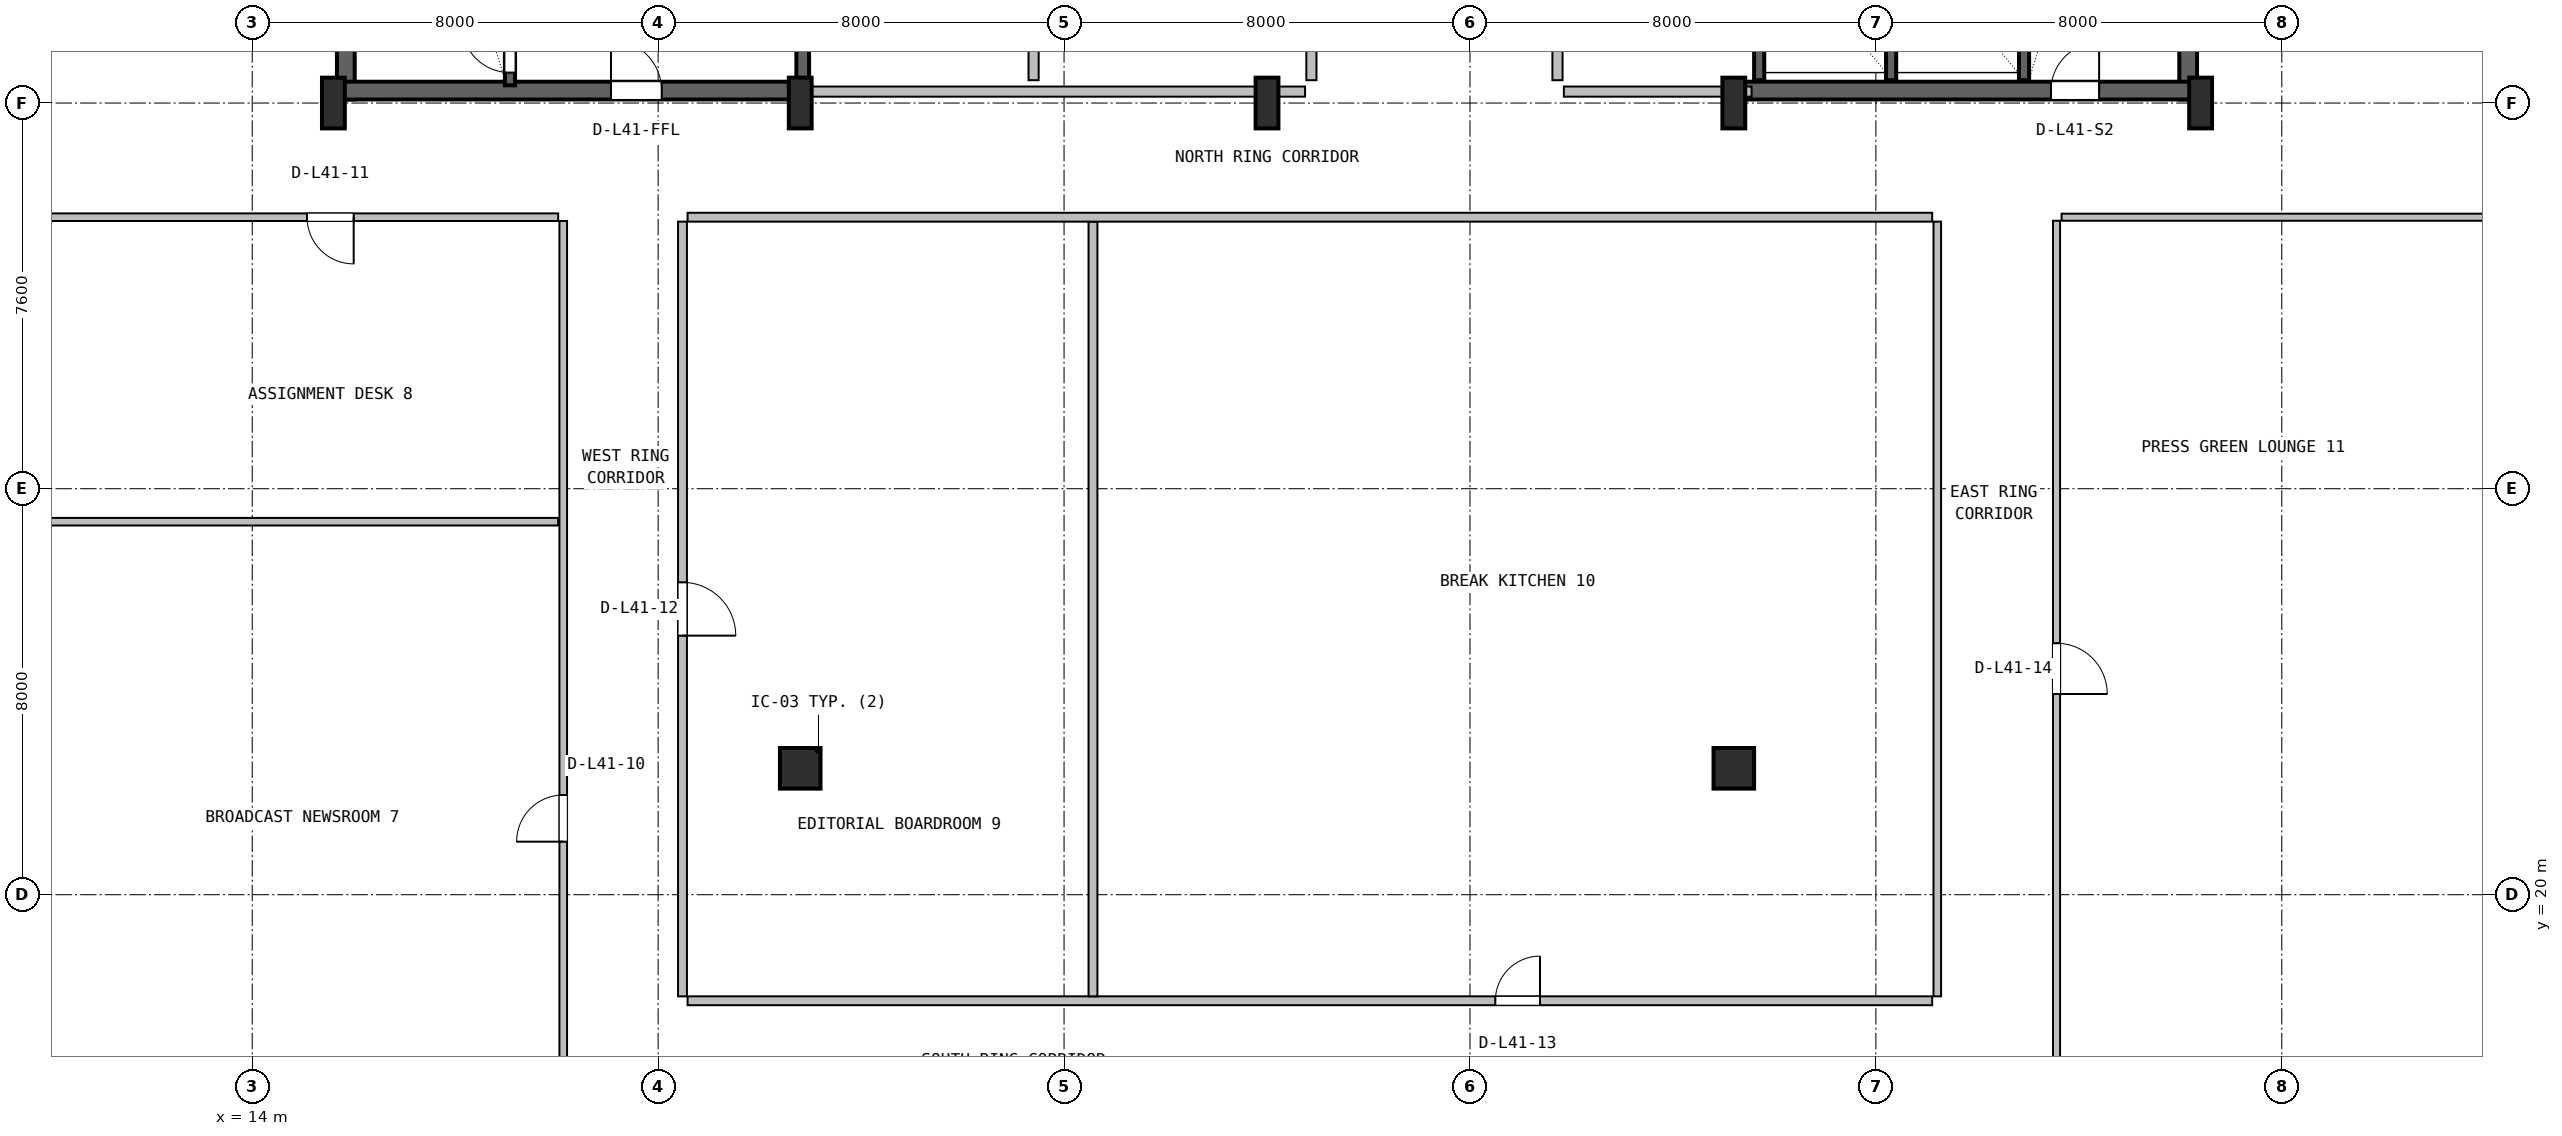
"""IFC4 building model, lengths in metres.
Left out: names, types, materials, properties, quantities, classifications, styles, units other than length and angle.
Written with IfcOpenShell. Run it as: python <this file> out.ifc"""

import sys

from ifc_helpers import new_model, si_unit, direction, frame, frame_2d, origin, origin_2d, place, context, subcontext, project, spatial, rectangle, i_section, extrude, source, transform, mapped, element, fill, save


model = new_model("IFC4")
c1 = context("Model", 3, precision=1e-05, world=origin(), true_north=direction((0.0, 1.0)))
c2 = subcontext(c1, "Body", "Model", "MODEL_VIEW")
j1 = project(units=[si_unit("LENGTHUNIT", "METRE"), si_unit("PLANEANGLEUNIT", "RADIAN")], contexts=[c1])
p1 = place(None, origin())
s1 = spatial("IfcSite", under=j1, at=p1, CompositionType="ELEMENT")
p2 = place(p1, origin())
s2 = spatial("IfcBuilding", under=s1, at=p2, CompositionType="ELEMENT")
p3 = place(p2, frame((0.0, 0.0, 168.6)))
s3 = spatial("IfcBuildingStorey", under=s2, at=p3, CompositionType="ELEMENT", Elevation=168.6)
for number, where, z_axis, x_axis in (
    (1, (15.845, 35.67, 0.0), (0.0, 0.0, 1.0), (0.0, 1.0, 0.0)),
    (2, (52.155, 35.67, 0.0), (0.0, 0.0, 1.0), (0.0, 1.0, 0.0)),
):
    element("IfcWall", number, at=place(p3, frame(where, z_axis=z_axis, x_axis=x_axis)), inside=s3, PredefinedType="SHEAR", context=c2, shape_type="SweptSolid", body=[
        extrude(rectangle(XDim=11.13, YDim=0.35, at=frame_2d((5.565, 0.0))), origin(), (0.0, 0.0, 1.0), 3.55),
    ])
p4 = place(p3, frame((15.67, 35.845, 0.0), z_axis=(0.0, 0.0, 1.0), x_axis=(1.0, 0.0, 0.0)))
e3 = element("IfcWall", 3, at=p4, inside=s3, PredefinedType="SHEAR", context=c2, shape_type="SweptSolid", body=[
    extrude(rectangle(XDim=9.13, YDim=0.35, at=frame_2d((4.565, 0.0))), origin(), (0.0, 0.0, 1.0), 3.55),
])
p5 = place(p4, frame((5.4, 0.0, 0.0)))
e4 = element("IfcOpeningElement", 4, at=p5, cuts=e3, PredefinedType="OPENING", context=c2, shape_type="SweptSolid", body=[
    extrude(rectangle(XDim=1.0, YDim=2.1, at=frame_2d((0.5, 1.05))), frame((0.0, 0.185, 0.0), z_axis=(0.0, -1.0, 0.0), x_axis=(1.0, 0.0, 0.0)), (0.0, 0.0, 1.0), 0.37),
])
p6 = place(p3, frame((43.2, 35.845, 0.0), z_axis=(0.0, 0.0, 1.0), x_axis=(1.0, 0.0, 0.0)))
e5 = element("IfcWall", 5, at=p6, inside=s3, PredefinedType="SHEAR", context=c2, shape_type="SweptSolid", body=[
    extrude(rectangle(XDim=9.13, YDim=0.35, at=frame_2d((4.565, 0.0))), origin(), (0.0, 0.0, 1.0), 3.55),
])
p7 = place(p6, frame((6.25, 0.0, 0.0)))
e6 = element("IfcOpeningElement", 6, at=p7, cuts=e5, PredefinedType="OPENING", context=c2, shape_type="SweptSolid", body=[
    extrude(rectangle(XDim=0.95, YDim=2.1, at=frame_2d((0.475, 1.05))), frame((0.0, 0.185, 0.0), z_axis=(0.0, -1.0, 0.0), x_axis=(1.0, 0.0, 0.0)), (0.0, 0.0, 1.0), 0.37),
])
m1 = source(origin(), c2, "Body", "SweptSolid", [
    extrude(i_section(OverallWidth=0.45, OverallDepth=1.0, WebThickness=0.016, FlangeThickness=0.03, FilletRadius=0.016, at=origin_2d()), origin(), (0.0, 0.0, 1.0), 3.8),
])
for number, where, z_axis, x_axis in (
    (7, (15.6, 35.6, 0.0), (0.0, 0.0, 1.0), (1.0, 0.0, 0.0)),
    (8, (24.8, 35.6, 0.0), (0.0, 0.0, 1.0), (1.0, 0.0, 0.0)),
    (9, (34.0, 35.6, 0.0), (0.0, 0.0, 1.0), (1.0, 0.0, 0.0)),
    (10, (43.2, 35.6, 0.0), (0.0, 0.0, 1.0), (1.0, 0.0, 0.0)),
    (11, (52.4, 35.6, 0.0), (0.0, 0.0, 1.0), (1.0, 0.0, 0.0)),
):
    element("IfcColumn", number, at=place(p3, frame(where, z_axis=z_axis, x_axis=x_axis)), inside=s3, PredefinedType="COLUMN", context=c2, shape_type="MappedRepresentation", body=[
        mapped(m1, transform((0.0, 0.0, 0.0), x_axis=(1.0, 0.0, 0.0), y_axis=(0.0, 1.0, 0.0), z_axis=(0.0, 0.0, 1.0), scale=1.0)),
    ])
m2 = source(origin(), c2, "Body", "SweptSolid", [
    extrude(rectangle(XDim=0.8, YDim=0.8, at=origin_2d()), origin(), (0.0, 0.0, 1.0), 3.8),
])
for number, where, z_axis, x_axis in (
    (12, (24.8, 22.49, 0.0), (0.0, 0.0, 1.0), (1.0, 0.0, 0.0)),
    (13, (43.2, 22.49, 0.0), (0.0, 0.0, 1.0), (1.0, 0.0, 0.0)),
):
    element("IfcColumn", number, at=place(p3, frame(where, z_axis=z_axis, x_axis=x_axis)), inside=s3, PredefinedType="COLUMN", context=c2, shape_type="MappedRepresentation", body=[
        mapped(m2, transform((0.0, 0.0, 0.0), x_axis=(1.0, 0.0, 0.0), y_axis=(0.0, 1.0, 0.0), z_axis=(0.0, 0.0, 1.0), scale=1.0)),
    ])
p8 = place(p3, frame((19.08, 35.95, 0.0), z_axis=(0.0, 0.0, 1.0), x_axis=(0.0, 1.0, 0.0)))
e14 = element("IfcWall", 14, at=p8, inside=s3, PredefinedType="SHEAR", context=c2, shape_type="SweptSolid", body=[
    extrude(rectangle(XDim=9.65, YDim=0.2, at=frame_2d((4.825, 0.0))), origin(), (0.0, 0.0, 1.0), 3.55),
])
p9 = place(p8, frame((0.25, 0.0, 0.0)))
e15 = element("IfcOpeningElement", 15, at=p9, cuts=e14, PredefinedType="OPENING", context=c2, shape_type="SweptSolid", body=[
    extrude(rectangle(XDim=0.95, YDim=2.1, at=frame_2d((0.475, 1.05))), frame((0.0, 0.11, 0.0), z_axis=(0.0, -1.0, 0.0), x_axis=(1.0, 0.0, 0.0)), (0.0, 0.0, 1.0), 0.22),
])
p10 = place(p3, frame((24.85, 36.05, 0.0), z_axis=(0.0, 0.0, 1.0), x_axis=(0.0, 1.0, 0.0)))
e16 = element("IfcWall", 16, at=p10, inside=s3, PredefinedType="SHEAR", context=c2, shape_type="SweptSolid", body=[
    extrude(rectangle(XDim=10.45, YDim=0.25, at=frame_2d((5.225, 0.0))), origin(), (0.0, 0.0, 1.0), 3.55),
])
p11 = place(p3, frame((48.92, 36.05, 0.0), z_axis=(0.0, 0.0, 1.0), x_axis=(0.0, 1.0, 0.0)))
e17 = element("IfcWall", 17, at=p11, inside=s3, PredefinedType="SHEAR", context=c2, shape_type="SweptSolid", body=[
    extrude(rectangle(XDim=10.5, YDim=0.2, at=frame_2d((5.25, 0.0))), origin(), (0.0, 0.0, 1.0), 3.55),
])
for number, where, z_axis, x_axis in (
    (18, (43.7, 36.05, 0.0), (0.0, 0.0, 1.0), (0.0, 1.0, 0.0)),
    (19, (46.3, 36.05, 0.0), (0.0, 0.0, 1.0), (0.0, 1.0, 0.0)),
):
    element("IfcWall", number, at=place(p3, frame(where, z_axis=z_axis, x_axis=x_axis)), inside=s3, PredefinedType="SHEAR", context=c2, shape_type="SweptSolid", body=[
        extrude(rectangle(XDim=3.05, YDim=0.2, at=frame_2d((1.525, 0.0))), origin(), (0.0, 0.0, 1.0), 3.55),
    ])
p12 = place(p3, frame((25.0, 35.825, 0.0), z_axis=(0.0, 0.0, 1.0), x_axis=(1.0, 0.0, 0.0)))
e20 = element("IfcWall", 20, at=p12, inside=s3, PredefinedType="PLUMBINGWALL", context=c2, shape_type="SweptSolid", body=[
    extrude(rectangle(XDim=9.75, YDim=0.2, at=frame_2d((4.875, 0.0))), origin(), (0.0, 0.0, 1.0), 2.575),
])
for number, where, z_axis, x_axis in (
    (21, (29.4, 36.05, 0.0), (0.0, 0.0, 1.0), (0.0, 1.0, 0.0)),
    (22, (34.875, 36.05, 0.0), (0.0, 0.0, 1.0), (0.0, 1.0, 0.0)),
):
    element("IfcWall", number, at=place(p3, frame(where, z_axis=z_axis, x_axis=x_axis)), inside=s3, PredefinedType="PLUMBINGWALL", context=c2, shape_type="SweptSolid", body=[
        extrude(rectangle(XDim=3.1, YDim=0.2, at=frame_2d((1.55, 0.0))), origin(), (0.0, 0.0, 1.0), 3.53),
    ])
p13 = place(p3, frame((39.85, 35.825, 0.0), z_axis=(0.0, 0.0, 1.0), x_axis=(1.0, 0.0, 0.0)))
e23 = element("IfcWall", 23, at=p13, inside=s3, PredefinedType="SOLIDWALL", context=c2, shape_type="SweptSolid", body=[
    extrude(rectangle(XDim=3.7, YDim=0.2, at=frame_2d((1.85, 0.0))), origin(), (0.0, 0.0, 1.0), 2.575),
])
p14 = place(p3, frame((39.725, 36.05, 0.0), z_axis=(0.0, 0.0, 1.0), x_axis=(0.0, 1.0, 0.0)))
e24 = element("IfcWall", 24, at=p14, inside=s3, PredefinedType="SOLIDWALL", context=c2, shape_type="SweptSolid", body=[
    extrude(rectangle(XDim=3.1, YDim=0.2, at=frame_2d((1.55, 0.0))), origin(), (0.0, 0.0, 1.0), 3.53),
])
p15 = place(p3, frame((20.13, 15.635, 0.0), z_axis=(0.0, 0.0, 1.0), x_axis=(0.0, 1.0, 0.0)))
e25 = element("IfcWall", 25, at=p15, inside=s3, PredefinedType="PARTITIONING", context=c2, shape_type="SweptSolid", body=[
    extrude(rectangle(XDim=17.64, YDim=0.15, at=frame_2d((8.82, 0.0))), origin(), (0.0, 0.0, 1.0), 3.222),
])
p16 = place(p15, frame((5.41, 0.0, 0.0)))
e26 = element("IfcOpeningElement", 26, at=p16, cuts=e25, PredefinedType="OPENING", context=c2, shape_type="SweptSolid", body=[
    extrude(rectangle(XDim=0.92, YDim=2.08, at=frame_2d((0.46, 1.04))), frame((0.0, 0.085, 0.0), z_axis=(0.0, -1.0, 0.0), x_axis=(1.0, 0.0, 0.0)), (0.0, 0.0, 1.0), 0.17),
])
p17 = place(p3, frame((7.18, 27.35, 0.0), z_axis=(0.0, 0.0, 1.0), x_axis=(1.0, 0.0, 0.0)))
e27 = element("IfcWall", 27, at=p17, inside=s3, PredefinedType="PARTITIONING", context=c2, shape_type="SweptSolid", body=[
    extrude(rectangle(XDim=12.85, YDim=0.15, at=frame_2d((6.425, 0.0))), origin(), (0.0, 0.0, 1.0), 3.108),
])
p18 = place(p3, frame((7.18, 33.35, 0.0), z_axis=(0.0, 0.0, 1.0), x_axis=(1.0, 0.0, 0.0)))
e28 = element("IfcWall", 28, at=p18, inside=s3, PredefinedType="PARTITIONING", context=c2, shape_type="SweptSolid", body=[
    extrude(rectangle(XDim=12.85, YDim=0.15, at=frame_2d((6.425, 0.0))), origin(), (0.0, 0.0, 1.0), 3.108),
])
p19 = place(p18, frame((7.9, 0.0, 0.0)))
e29 = element("IfcOpeningElement", 29, at=p19, cuts=e28, PredefinedType="OPENING", context=c2, shape_type="SweptSolid", body=[
    extrude(rectangle(XDim=0.92, YDim=2.08, at=frame_2d((0.46, 1.04))), frame((0.0, 0.085, 0.0), z_axis=(0.0, -1.0, 0.0), x_axis=(1.0, 0.0, 0.0)), (0.0, 0.0, 1.0), 0.17),
])
p20 = place(p3, frame((22.58, 17.91, 0.0), z_axis=(0.0, 0.0, 1.0), x_axis=(1.0, 0.0, 0.0)))
e30 = element("IfcWall", 30, at=p20, inside=s3, PredefinedType="PARTITIONING", context=c2, shape_type="SweptSolid", body=[
    extrude(rectangle(XDim=24.53, YDim=0.175, at=frame_2d((12.265, 0.0))), origin(), (0.0, 0.0, 1.0), 2.909),
])
p21 = place(p20, frame((15.92, 0.0, 0.0)))
e31 = element("IfcOpeningElement", 31, at=p21, cuts=e30, PredefinedType="OPENING", context=c2, shape_type="SweptSolid", body=[
    extrude(rectangle(XDim=0.88, YDim=2.06, at=frame_2d((0.44, 1.03))), frame((0.0, 0.098, 0.0), z_axis=(0.0, -1.0, 0.0), x_axis=(1.0, 0.0, 0.0)), (0.0, 0.0, 1.0), 0.195),
])
p22 = place(p3, frame((30.57, 17.997, 0.0), z_axis=(0.0, 0.0, 1.0), x_axis=(0.0, 1.0, 0.0)))
e32 = element("IfcWall", 32, at=p22, inside=s3, PredefinedType="PARTITIONING", context=c2, shape_type="SweptSolid", body=[
    extrude(rectangle(XDim=15.266, YDim=0.175, at=frame_2d((7.633, 0.0))), origin(), (0.0, 0.0, 1.0), 2.909),
])
p23 = place(p3, frame((22.58, 33.35, 0.0), z_axis=(0.0, 0.0, 1.0), x_axis=(1.0, 0.0, 0.0)))
e33 = element("IfcWall", 33, at=p23, inside=s3, PredefinedType="PARTITIONING", context=c2, shape_type="SweptSolid", body=[
    extrude(rectangle(XDim=24.53, YDim=0.175, at=frame_2d((12.265, 0.0))), origin(), (0.0, 0.0, 1.0), 2.909),
])
p24 = place(p3, frame((22.48, 17.997, 0.0), z_axis=(0.0, 0.0, 1.0), x_axis=(0.0, 1.0, 0.0)))
e34 = element("IfcWall", 34, at=p24, inside=s3, PredefinedType="PARTITIONING", context=c2, shape_type="SweptSolid", body=[
    extrude(rectangle(XDim=15.266, YDim=0.175, at=frame_2d((7.633, 0.0))), origin(), (0.0, 0.0, 1.0), 3.222),
])
p25 = place(p24, frame((7.108, 0.0, 0.0)))
e35 = element("IfcOpeningElement", 35, at=p25, cuts=e34, PredefinedType="OPENING", context=c2, shape_type="SweptSolid", body=[
    extrude(rectangle(XDim=1.05, YDim=2.1, at=frame_2d((0.525, 1.05))), frame((0.0, 0.098, 0.0), z_axis=(0.0, -1.0, 0.0), x_axis=(1.0, 0.0, 0.0)), (0.0, 0.0, 1.0), 0.195),
])
p26 = place(p3, frame((47.21, 17.997, 0.0), z_axis=(0.0, 0.0, 1.0), x_axis=(0.0, 1.0, 0.0)))
e36 = element("IfcWall", 36, at=p26, inside=s3, PredefinedType="PARTITIONING", context=c2, shape_type="SweptSolid", body=[
    extrude(rectangle(XDim=15.266, YDim=0.15, at=frame_2d((7.633, 0.0))), origin(), (0.0, 0.0, 1.0), 3.222),
])
p27 = place(p3, frame((49.66, 33.35, 0.0), z_axis=(0.0, 0.0, 1.0), x_axis=(1.0, 0.0, 0.0)))
e37 = element("IfcWall", 37, at=p27, inside=s3, PredefinedType="PARTITIONING", context=c2, shape_type="SweptSolid", body=[
    extrude(rectangle(XDim=11.16, YDim=0.14, at=frame_2d((5.58, 0.0))), origin(), (0.0, 0.0, 1.0), 3.108),
])
p28 = place(p3, frame((49.56, 15.635, 0.0), z_axis=(0.0, 0.0, 1.0), x_axis=(0.0, 1.0, 0.0)))
e38 = element("IfcWall", 38, at=p28, inside=s3, PredefinedType="PARTITIONING", context=c2, shape_type="SweptSolid", body=[
    extrude(rectangle(XDim=17.645, YDim=0.14, at=frame_2d((8.823, 0.0))), origin(), (0.0, 0.0, 1.0), 3.222),
])
p29 = place(p28, frame((8.32, 0.0, 0.0)))
e39 = element("IfcOpeningElement", 39, at=p29, cuts=e38, PredefinedType="OPENING", context=c2, shape_type="SweptSolid", body=[
    extrude(rectangle(XDim=1.0, YDim=2.1, at=frame_2d((0.5, 1.05))), frame((0.0, 0.08, 0.0), z_axis=(0.0, -1.0, 0.0), x_axis=(1.0, 0.0, 0.0)), (0.0, 0.0, 1.0), 0.16),
])
m3 = source(origin(), c2, "Body", "SweptSolid", [
    extrude(rectangle(XDim=0.95, YDim=2.1, at=frame_2d((0.475, 1.05))), frame((0.0, 0.025, 0.0), z_axis=(0.0, -1.0, 0.0), x_axis=(1.0, 0.0, 0.0)), (0.0, 0.0, 1.0), 0.05),
])
p30 = place(p9, origin())
e40 = element("IfcDoor", 40, at=p30, inside=s3, OperationType="SINGLE_SWING_RIGHT", PredefinedType="DOOR", context=c2, shape_type="MappedRepresentation", body=[
    mapped(m3, transform((0.0, 0.0, 0.0), x_axis=(1.0, 0.0, 0.0), y_axis=(0.0, 1.0, 0.0), z_axis=(0.0, 0.0, 1.0), scale=1.0)),
])
fill(e15, e40)
m4 = source(origin(), c2, "Body", "SweptSolid", [
    extrude(rectangle(XDim=1.0, YDim=2.1, at=frame_2d((0.5, 1.05))), frame((0.0, 0.025, 0.0), z_axis=(0.0, -1.0, 0.0), x_axis=(1.0, 0.0, 0.0)), (0.0, 0.0, 1.0), 0.05),
])
p31 = place(p5, origin())
e41 = element("IfcDoor", 41, at=p31, inside=s3, OperationType="SINGLE_SWING_LEFT", PredefinedType="DOOR", context=c2, shape_type="MappedRepresentation", body=[
    mapped(m4, transform((0.0, 0.0, 0.0), x_axis=(1.0, 0.0, 0.0), y_axis=(0.0, 1.0, 0.0), z_axis=(0.0, 0.0, 1.0), scale=1.0)),
])
fill(e4, e41)
p32 = place(p7, origin())
e42 = element("IfcDoor", 42, at=p32, inside=s3, OperationType="SINGLE_SWING_RIGHT", PredefinedType="DOOR", context=c2, shape_type="MappedRepresentation", body=[
    mapped(m3, transform((0.0, 0.0, 0.0), x_axis=(1.0, 0.0, 0.0), y_axis=(0.0, 1.0, 0.0), z_axis=(0.0, 0.0, 1.0), scale=1.0)),
])
fill(e6, e42)
m5 = source(origin(), c2, "Body", "SweptSolid", [
    extrude(rectangle(XDim=0.92, YDim=2.08, at=frame_2d((0.46, 1.04))), frame((0.0, 0.025, 0.0), z_axis=(0.0, -1.0, 0.0), x_axis=(1.0, 0.0, 0.0)), (0.0, 0.0, 1.0), 0.05),
])
p33 = place(p16, origin())
e43 = element("IfcDoor", 43, at=p33, inside=s3, OperationType="SINGLE_SWING_LEFT", PredefinedType="DOOR", context=c2, shape_type="MappedRepresentation", body=[
    mapped(m5, transform((0.0, 0.0, 0.0), x_axis=(1.0, 0.0, 0.0), y_axis=(0.0, 1.0, 0.0), z_axis=(0.0, 0.0, 1.0), scale=1.0)),
])
fill(e26, e43)
p34 = place(p19, frame((0.92, 0.0, 0.0), z_axis=(0.0, 0.0, 1.0), x_axis=(-1.0, 0.0, 0.0)))
e44 = element("IfcDoor", 44, at=p34, inside=s3, OperationType="SINGLE_SWING_RIGHT", PredefinedType="DOOR", context=c2, shape_type="MappedRepresentation", body=[
    mapped(m5, transform((0.0, 0.0, 0.0), x_axis=(1.0, 0.0, 0.0), y_axis=(0.0, 1.0, 0.0), z_axis=(0.0, 0.0, 1.0), scale=1.0)),
])
fill(e29, e44)
m6 = source(origin(), c2, "Body", "SweptSolid", [
    extrude(rectangle(XDim=1.05, YDim=2.1, at=frame_2d((0.525, 1.05))), frame((0.0, 0.025, 0.0), z_axis=(0.0, -1.0, 0.0), x_axis=(1.0, 0.0, 0.0)), (0.0, 0.0, 1.0), 0.05),
])
p35 = place(p25, frame((1.05, 0.0, 0.0), z_axis=(0.0, 0.0, 1.0), x_axis=(-1.0, 0.0, 0.0)))
e45 = element("IfcDoor", 45, at=p35, inside=s3, OperationType="SINGLE_SWING_LEFT", PredefinedType="DOOR", context=c2, shape_type="MappedRepresentation", body=[
    mapped(m6, transform((0.0, 0.0, 0.0), x_axis=(1.0, 0.0, 0.0), y_axis=(0.0, 1.0, 0.0), z_axis=(0.0, 0.0, 1.0), scale=1.0)),
])
fill(e35, e45)
m7 = source(origin(), c2, "Body", "SweptSolid", [
    extrude(rectangle(XDim=0.88, YDim=2.06, at=frame_2d((0.44, 1.03))), frame((0.0, 0.025, 0.0), z_axis=(0.0, -1.0, 0.0), x_axis=(1.0, 0.0, 0.0)), (0.0, 0.0, 1.0), 0.05),
])
p36 = place(p21, origin())
e46 = element("IfcDoor", 46, at=p36, inside=s3, OperationType="SINGLE_SWING_RIGHT", PredefinedType="DOOR", context=c2, shape_type="MappedRepresentation", body=[
    mapped(m7, transform((0.0, 0.0, 0.0), x_axis=(1.0, 0.0, 0.0), y_axis=(0.0, 1.0, 0.0), z_axis=(0.0, 0.0, 1.0), scale=1.0)),
])
fill(e31, e46)
m8 = source(origin(), c2, "Body", "SweptSolid", [
    extrude(rectangle(XDim=1.0, YDim=2.1, at=frame_2d((0.5, 1.05))), frame((0.0, 0.025, 0.0), z_axis=(0.0, -1.0, 0.0), x_axis=(1.0, 0.0, 0.0)), (0.0, 0.0, 1.0), 0.05),
])
p37 = place(p29, frame((1.0, 0.0, 0.0), z_axis=(0.0, 0.0, 1.0), x_axis=(-1.0, 0.0, 0.0)))
e47 = element("IfcDoor", 47, at=p37, inside=s3, OperationType="SINGLE_SWING_LEFT", PredefinedType="DOOR", context=c2, shape_type="MappedRepresentation", body=[
    mapped(m8, transform((0.0, 0.0, 0.0), x_axis=(1.0, 0.0, 0.0), y_axis=(0.0, 1.0, 0.0), z_axis=(0.0, 0.0, 1.0), scale=1.0)),
])
fill(e39, e47)
save(model, sys.argv[1])
